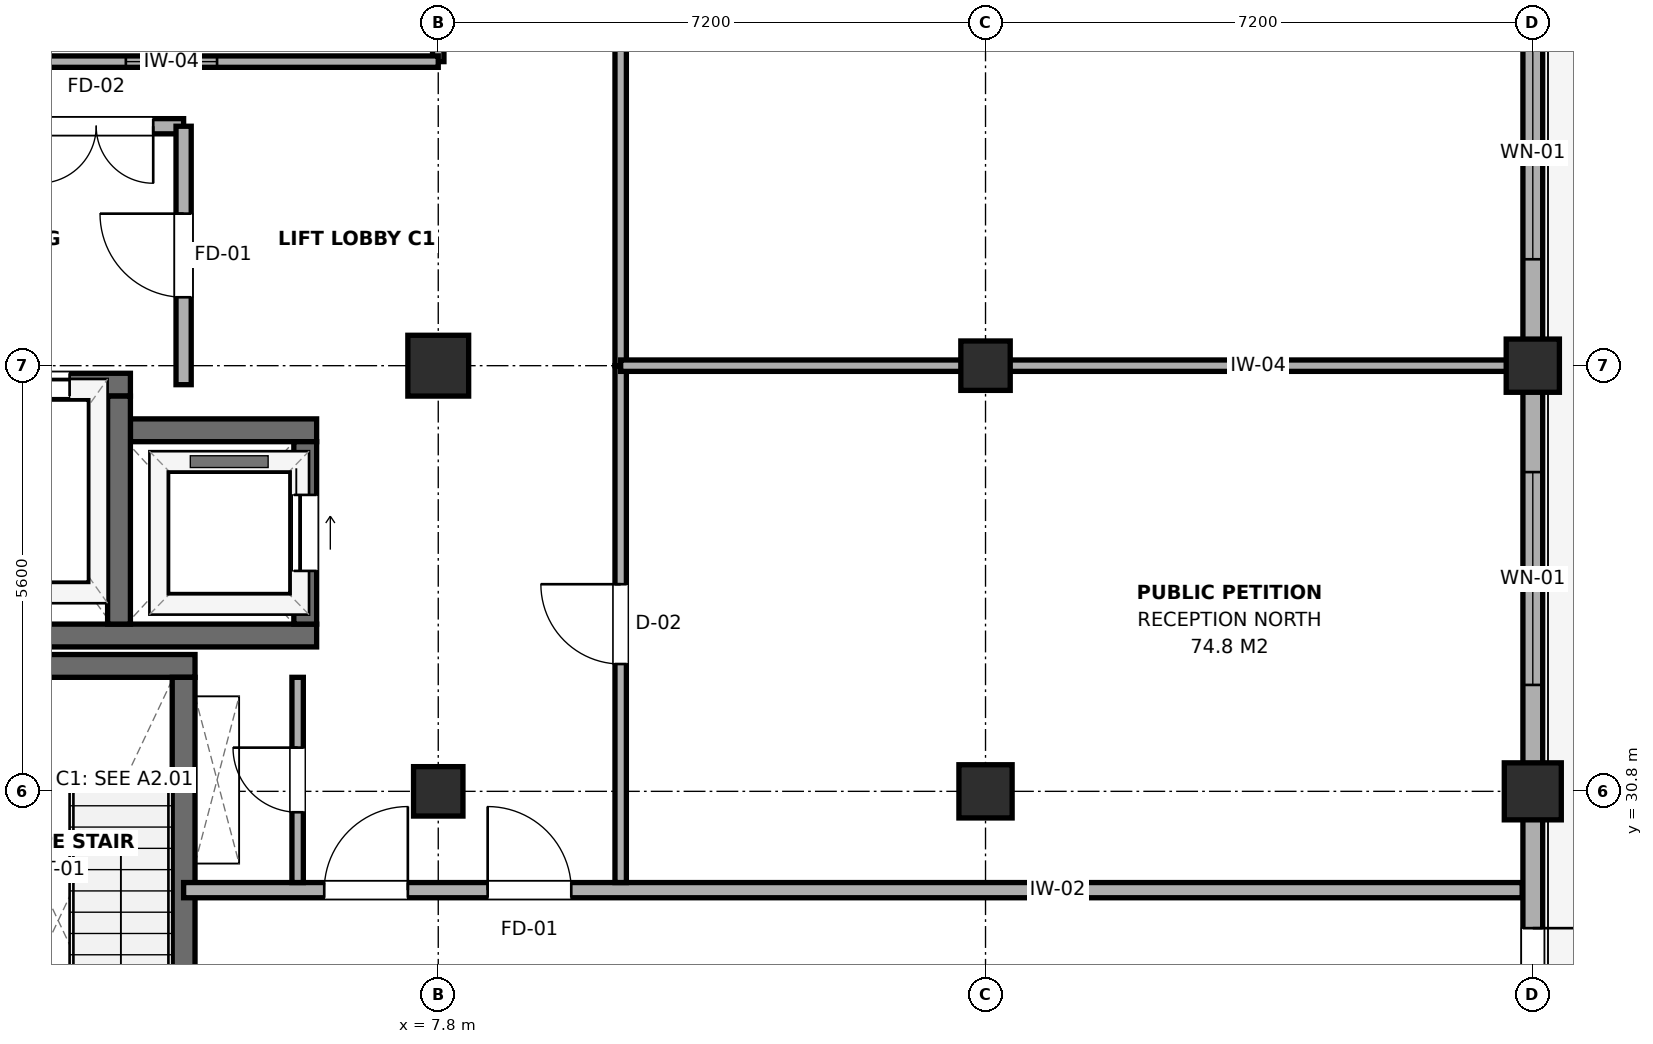
"""IFC4 building model, lengths in metres.
Left out: names, types, materials, properties, quantities, classifications, styles, units other than length and angle.
Written with IfcOpenShell. Run it as: python <this file> out.ifc"""

import sys

from ifc_helpers import new_model, si_unit, direction, frame, frame_2d, origin, origin_2d, place, context, subcontext, project, spatial, rectangle, extrude, element, fill, save


model = new_model("IFC4")
c1 = context("Model", 3, precision=1e-05, world=origin(), true_north=direction((0.0, 1.0)))
c2 = subcontext(c1, "Body", "Model", "MODEL_VIEW")
j1 = project(units=[si_unit("LENGTHUNIT", "METRE"), si_unit("PLANEANGLEUNIT", "RADIAN")], contexts=[c1])
p1 = place(None, origin())
s1 = spatial("IfcSite", under=j1, at=p1, CompositionType="ELEMENT")
p2 = place(p1, origin())
s2 = spatial("IfcBuilding", under=s1, at=p2, CompositionType="ELEMENT")
p3 = place(p2, origin())
s3 = spatial("IfcBuildingStorey", under=s2, at=p3, CompositionType="ELEMENT", Elevation=0.0)
p4 = place(p3, frame((7.8, 30.8, 0.0), z_axis=(0.0, 0.0, 1.0), x_axis=(1.0, 0.0, 0.0)))
e1 = element("IfcColumn", 1, at=p4, inside=s3, PredefinedType="COLUMN", context=c2, shape_type="SweptSolid", body=[
    extrude(rectangle(XDim=0.65, YDim=0.65, at=origin_2d()), origin(), (0.0, 0.0, 1.0), 4.8),
])
p5 = place(p3, frame((7.8, 36.4, 0.0), z_axis=(0.0, 0.0, 1.0), x_axis=(1.0, 0.0, 0.0)))
e2 = element("IfcColumn", 2, at=p5, inside=s3, PredefinedType="COLUMN", context=c2, shape_type="SweptSolid", body=[
    extrude(rectangle(XDim=0.8, YDim=0.8, at=origin_2d()), origin(), (0.0, 0.0, 1.0), 4.8),
])
p6 = place(p3, frame((15.0, 30.8, 0.0), z_axis=(0.0, 0.0, 1.0), x_axis=(1.0, 0.0, 0.0)))
e3 = element("IfcColumn", 3, at=p6, inside=s3, PredefinedType="COLUMN", context=c2, shape_type="SweptSolid", body=[
    extrude(rectangle(XDim=0.7, YDim=0.7, at=origin_2d()), origin(), (0.0, 0.0, 1.0), 4.8),
])
p7 = place(p3, frame((15.0, 36.4, 0.0), z_axis=(0.0, 0.0, 1.0), x_axis=(1.0, 0.0, 0.0)))
e4 = element("IfcColumn", 4, at=p7, inside=s3, PredefinedType="COLUMN", context=c2, shape_type="SweptSolid", body=[
    extrude(rectangle(XDim=0.65, YDim=0.65, at=origin_2d()), origin(), (0.0, 0.0, 1.0), 4.8),
])
p8 = place(p3, frame((22.2, 30.8, 0.0), z_axis=(0.0, 0.0, 1.0), x_axis=(1.0, 0.0, 0.0)))
e5 = element("IfcColumn", 5, at=p8, inside=s3, PredefinedType="COLUMN", context=c2, shape_type="SweptSolid", body=[
    extrude(rectangle(XDim=0.75, YDim=0.75, at=origin_2d()), origin(), (0.0, 0.0, 1.0), 4.8),
])
p9 = place(p3, frame((22.2, 36.4, 0.0), z_axis=(0.0, 0.0, 1.0), x_axis=(1.0, 0.0, 0.0)))
e6 = element("IfcColumn", 6, at=p9, inside=s3, PredefinedType="COLUMN", context=c2, shape_type="SweptSolid", body=[
    extrude(rectangle(XDim=0.7, YDim=0.7, at=origin_2d()), origin(), (0.0, 0.0, 1.0), 4.8),
])
p10 = place(p3, frame((0.75, 32.45, 0.0), z_axis=(0.0, 0.0, 1.0), x_axis=(1.0, 0.0, 0.0)))
e7 = element("IfcWall", 7, at=p10, inside=s3, PredefinedType="SHEAR", context=c2, shape_type="SweptSolid", body=[
    extrude(rectangle(XDim=3.85, YDim=0.3, at=frame_2d((1.925, 0.0))), origin(), (0.0, 0.0, 1.0), 4.56),
])
p11 = place(p3, frame((4.45, 25.9, 0.0), z_axis=(0.0, 0.0, 1.0), x_axis=(0.0, 1.0, 0.0)))
e8 = element("IfcWall", 8, at=p11, inside=s3, PredefinedType="SHEAR", context=c2, shape_type="SweptSolid", body=[
    extrude(rectangle(XDim=6.4, YDim=0.3, at=frame_2d((3.2, 0.0))), origin(), (0.0, 0.0, 1.0), 4.56),
])
p12 = place(p11, frame((0.17, 0.0, 0.0)))
e9 = element("IfcOpeningElement", 9, at=p12, cuts=e8, PredefinedType="OPENING", context=c2, shape_type="SweptSolid", body=[
    extrude(rectangle(XDim=1.1, YDim=2.15, at=frame_2d((0.55, 1.075))), frame((0.0, 0.165, 0.0), z_axis=(0.0, -1.0, 0.0), x_axis=(1.0, 0.0, 0.0)), (0.0, 0.0, 1.0), 0.33),
])
p13 = place(p3, frame((0.75, 32.85, 0.0), z_axis=(0.0, 0.0, 1.0), x_axis=(1.0, 0.0, 0.0)))
e10 = element("IfcWall", 10, at=p13, inside=s3, PredefinedType="SHEAR", context=c2, shape_type="SweptSolid", body=[
    extrude(rectangle(XDim=5.45, YDim=0.3, at=frame_2d((2.725, 0.0))), origin(), (0.0, 0.0, 1.0), 4.56),
])
p14 = place(p3, frame((0.75, 36.15, 0.0), z_axis=(0.0, 0.0, 1.0), x_axis=(1.0, 0.0, 0.0)))
e11 = element("IfcWall", 11, at=p14, inside=s3, PredefinedType="SHEAR", context=c2, shape_type="SweptSolid", body=[
    extrude(rectangle(XDim=3.0, YDim=0.3, at=frame_2d((1.5, 0.0))), origin(), (0.0, 0.0, 1.0), 4.56),
])
p15 = place(p14, frame((1.1, 0.0, 0.0)))
e12 = element("IfcOpeningElement", 12, at=p15, cuts=e11, PredefinedType="OPENING", context=c2, shape_type="SweptSolid", body=[
    extrude(rectangle(XDim=1.1, YDim=2.15, at=frame_2d((0.55, 1.075))), frame((0.0, 0.165, 0.0), z_axis=(0.0, -1.0, 0.0), x_axis=(1.0, 0.0, 0.0)), (0.0, 0.0, 1.0), 0.33),
])
p16 = place(p3, frame((3.75, 35.55, 0.0), z_axis=(0.0, 0.0, 1.0), x_axis=(1.0, 0.0, 0.0)))
e13 = element("IfcWall", 13, at=p16, inside=s3, PredefinedType="SHEAR", context=c2, shape_type="SweptSolid", body=[
    extrude(rectangle(XDim=2.45, YDim=0.3, at=frame_2d((1.225, 0.0))), origin(), (0.0, 0.0, 1.0), 4.56),
])
p17 = place(p3, frame((3.6, 33.0, 0.0), z_axis=(0.0, 0.0, 1.0), x_axis=(0.0, 1.0, 0.0)))
e14 = element("IfcWall", 14, at=p17, inside=s3, PredefinedType="SHEAR", context=c2, shape_type="SweptSolid", body=[
    extrude(rectangle(XDim=3.0, YDim=0.3, at=frame_2d((1.5, 0.0))), origin(), (0.0, 0.0, 1.0), 4.56),
])
p18 = place(p3, frame((6.05, 33.0, 0.0), z_axis=(0.0, 0.0, 1.0), x_axis=(0.0, 1.0, 0.0)))
e15 = element("IfcWall", 15, at=p18, inside=s3, PredefinedType="SHEAR", context=c2, shape_type="SweptSolid", body=[
    extrude(rectangle(XDim=2.4, YDim=0.3, at=frame_2d((1.2, 0.0))), origin(), (0.0, 0.0, 1.0), 4.56),
])
p19 = place(p18, frame((0.7, 0.0, 0.0)))
e16 = element("IfcOpeningElement", 16, at=p19, cuts=e15, PredefinedType="OPENING", context=c2, shape_type="SweptSolid", body=[
    extrude(rectangle(XDim=1.0, YDim=2.15, at=frame_2d((0.5, 1.075))), frame((0.0, 0.165, 0.0), z_axis=(0.0, -1.0, 0.0), x_axis=(1.0, 0.0, 0.0)), (0.0, 0.0, 1.0), 0.33),
])
p20 = place(p3, frame((22.2, 25.2, 0.0), z_axis=(0.0, 0.0, 1.0), x_axis=(0.0, 1.0, 0.0)))
e17 = element("IfcWall", 17, at=p20, inside=s3, PredefinedType="SOLIDWALL", context=c2, shape_type="SweptSolid", body=[
    extrude(rectangle(XDim=5.6, YDim=0.26, at=frame_2d((2.8, 0.0))), origin(), (0.0, 0.0, 1.0), 4.005),
])
p21 = place(p20, frame((1.8, 0.0, 0.0)))
e18 = element("IfcOpeningElement", 18, at=p21, cuts=e17, PredefinedType="OPENING", context=c2, shape_type="SweptSolid", body=[
    extrude(rectangle(XDim=2.0, YDim=2.25, at=frame_2d((1.0, 1.125))), frame((0.0, 0.145, 0.0), z_axis=(0.0, -1.0, 0.0), x_axis=(1.0, 0.0, 0.0)), (0.0, 0.0, 1.0), 0.29),
])
p22 = place(p3, frame((22.2, 30.8, 0.0), z_axis=(0.0, 0.0, 1.0), x_axis=(0.0, 1.0, 0.0)))
e19 = element("IfcWall", 19, at=p22, inside=s3, PredefinedType="SOLIDWALL", context=c2, shape_type="SweptSolid", body=[
    extrude(rectangle(XDim=5.6, YDim=0.26, at=frame_2d((2.8, 0.0))), origin(), (0.0, 0.0, 1.0), 4.055),
])
p23 = place(p22, frame((1.4, 0.0, 0.9)))
e20 = element("IfcOpeningElement", 20, at=p23, cuts=e19, PredefinedType="OPENING", context=c2, shape_type="SweptSolid", body=[
    extrude(rectangle(XDim=2.8, YDim=2.2, at=frame_2d((1.4, 1.1))), frame((0.0, 0.145, 0.0), z_axis=(0.0, -1.0, 0.0), x_axis=(1.0, 0.0, 0.0)), (0.0, 0.0, 1.0), 0.29),
])
p24 = place(p3, frame((22.2, 36.4, 0.0), z_axis=(0.0, 0.0, 1.0), x_axis=(0.0, 1.0, 0.0)))
e21 = element("IfcWall", 21, at=p24, inside=s3, PredefinedType="SOLIDWALL", context=c2, shape_type="SweptSolid", body=[
    extrude(rectangle(XDim=5.6, YDim=0.26, at=frame_2d((2.8, 0.0))), origin(), (0.0, 0.0, 1.0), 4.105),
])
p25 = place(p24, frame((1.4, 0.0, 0.9)))
e22 = element("IfcOpeningElement", 22, at=p25, cuts=e21, PredefinedType="OPENING", context=c2, shape_type="SweptSolid", body=[
    extrude(rectangle(XDim=2.8, YDim=2.2, at=frame_2d((1.4, 1.1))), frame((0.0, 0.145, 0.0), z_axis=(0.0, -1.0, 0.0), x_axis=(1.0, 0.0, 0.0)), (0.0, 0.0, 1.0), 0.29),
])
p26 = place(p3, frame((0.95, 39.55, 0.0), z_axis=(0.0, 0.0, 1.0), x_axis=(1.0, 0.0, 0.0)))
e23 = element("IfcWall", 23, at=p26, inside=s3, PredefinedType="PARTITIONING", context=c2, shape_type="SweptSolid", body=[
    extrude(rectangle(XDim=3.5, YDim=0.2, at=frame_2d((1.75, 0.0))), origin(), (0.0, 0.0, 1.0), 4.555),
])
p27 = place(p26, frame((1.6, 0.0, 0.0)))
e24 = element("IfcOpeningElement", 24, at=p27, cuts=e23, PredefinedType="OPENING", context=c2, shape_type="SweptSolid", body=[
    extrude(rectangle(XDim=1.5, YDim=2.15, at=frame_2d((0.75, 1.075))), frame((0.0, 0.115, 0.0), z_axis=(0.0, -1.0, 0.0), x_axis=(1.0, 0.0, 0.0)), (0.0, 0.0, 1.0), 0.23),
])
p28 = place(p3, frame((4.45, 36.15, 0.0), z_axis=(0.0, 0.0, 1.0), x_axis=(0.0, 1.0, 0.0)))
e25 = element("IfcWall", 25, at=p28, inside=s3, PredefinedType="PARTITIONING", context=c2, shape_type="SweptSolid", body=[
    extrude(rectangle(XDim=3.4, YDim=0.2, at=frame_2d((1.7, 0.0))), origin(), (0.0, 0.0, 1.0), 4.205),
])
p29 = place(p28, frame((1.15, 0.0, 0.0)))
e26 = element("IfcOpeningElement", 26, at=p29, cuts=e25, PredefinedType="OPENING", context=c2, shape_type="SweptSolid", body=[
    extrude(rectangle(XDim=1.1, YDim=2.15, at=frame_2d((0.55, 1.075))), frame((0.0, 0.115, 0.0), z_axis=(0.0, -1.0, 0.0), x_axis=(1.0, 0.0, 0.0)), (0.0, 0.0, 1.0), 0.23),
])
p30 = place(p3, frame((4.45, 29.5, 0.0), z_axis=(0.0, 0.0, 1.0), x_axis=(1.0, 0.0, 0.0)))
e27 = element("IfcWall", 27, at=p30, inside=s3, PredefinedType="PARTITIONING", context=c2, shape_type="SweptSolid", body=[
    extrude(rectangle(XDim=17.61, YDim=0.2, at=frame_2d((8.805, 0.0))), origin(), (0.0, 0.0, 1.0), 4.005),
])
p31 = place(p30, frame((1.85, 0.0, 0.0)))
e28 = element("IfcOpeningElement", 28, at=p31, cuts=e27, PredefinedType="OPENING", context=c2, shape_type="SweptSolid", body=[
    extrude(rectangle(XDim=1.1, YDim=2.15, at=frame_2d((0.55, 1.075))), frame((0.0, 0.115, 0.0), z_axis=(0.0, -1.0, 0.0), x_axis=(1.0, 0.0, 0.0)), (0.0, 0.0, 1.0), 0.23),
])
p32 = place(p30, frame((4.0, 0.0, 0.0)))
e29 = element("IfcOpeningElement", 29, at=p32, cuts=e27, PredefinedType="OPENING", context=c2, shape_type="SweptSolid", body=[
    extrude(rectangle(XDim=1.1, YDim=2.15, at=frame_2d((0.55, 1.075))), frame((0.0, 0.115, 0.0), z_axis=(0.0, -1.0, 0.0), x_axis=(1.0, 0.0, 0.0)), (0.0, 0.0, 1.0), 0.23),
])
p33 = place(p3, frame((5.95, 29.6, 0.0), z_axis=(0.0, 0.0, 1.0), x_axis=(0.0, 1.0, 0.0)))
e30 = element("IfcWall", 30, at=p33, inside=s3, PredefinedType="PARTITIONING", context=c2, shape_type="SweptSolid", body=[
    extrude(rectangle(XDim=2.7, YDim=0.15, at=frame_2d((1.35, 0.0))), origin(), (0.0, 0.0, 1.0), 4.555),
])
p34 = place(p33, frame((0.925, 0.0, 0.0)))
e31 = element("IfcOpeningElement", 31, at=p34, cuts=e30, PredefinedType="OPENING", context=c2, shape_type="SweptSolid", body=[
    extrude(rectangle(XDim=0.85, YDim=2.1, at=frame_2d((0.425, 1.05))), frame((0.0, 0.09, 0.0), z_axis=(0.0, -1.0, 0.0), x_axis=(1.0, 0.0, 0.0)), (0.0, 0.0, 1.0), 0.18),
])
p35 = place(p3, frame((7.8, 40.4, 0.0), z_axis=(0.0, 0.0, 1.0), x_axis=(0.0, 1.0, 0.0)))
e32 = element("IfcWall", 32, at=p35, inside=s3, PredefinedType="PARTITIONING", context=c2, shape_type="SweptSolid", body=[
    extrude(rectangle(XDim=18.4, YDim=0.15, at=frame_2d((9.2, 0.0))), origin(), (0.0, 0.0, 1.0), 3.955),
])
p36 = place(p35, frame((8.4, 0.0, 0.0)))
e33 = element("IfcOpeningElement", 33, at=p36, cuts=e32, PredefinedType="OPENING", context=c2, shape_type="SweptSolid", body=[
    extrude(rectangle(XDim=1.6, YDim=2.15, at=frame_2d((0.8, 1.075))), frame((0.0, 0.09, 0.0), z_axis=(0.0, -1.0, 0.0), x_axis=(1.0, 0.0, 0.0)), (0.0, 0.0, 1.0), 0.18),
])
p37 = place(p35, frame((3.3, 0.0, 0.95)))
e34 = element("IfcOpeningElement", 34, at=p37, cuts=e32, PredefinedType="OPENING", context=c2, shape_type="SweptSolid", body=[
    extrude(rectangle(XDim=2.6, YDim=1.5, at=frame_2d((1.3, 0.75))), frame((0.0, 0.09, 0.0), z_axis=(0.0, -1.0, 0.0), x_axis=(1.0, 0.0, 0.0)), (0.0, 0.0, 1.0), 0.18),
])
p38 = place(p3, frame((0.78, 40.4, 0.0), z_axis=(0.0, 0.0, 1.0), x_axis=(1.0, 0.0, 0.0)))
e35 = element("IfcWall", 35, at=p38, inside=s3, PredefinedType="PARTITIONING", context=c2, shape_type="SweptSolid", body=[
    extrude(rectangle(XDim=7.02, YDim=0.15, at=frame_2d((3.51, 0.0))), origin(), (0.0, 0.0, 1.0), 4.105),
])
p39 = place(p38, frame((2.91, 0.0, 0.95)))
e36 = element("IfcOpeningElement", 36, at=p39, cuts=e35, PredefinedType="OPENING", context=c2, shape_type="SweptSolid", body=[
    extrude(rectangle(XDim=1.2, YDim=1.5, at=frame_2d((0.6, 0.75))), frame((0.0, 0.09, 0.0), z_axis=(0.0, -1.0, 0.0), x_axis=(1.0, 0.0, 0.0)), (0.0, 0.0, 1.0), 0.18),
])
p40 = place(p3, frame((10.2, 29.6, 0.0), z_axis=(0.0, 0.0, 1.0), x_axis=(0.0, 1.0, 0.0)))
e37 = element("IfcWall", 37, at=p40, inside=s3, PredefinedType="PARTITIONING", context=c2, shape_type="SweptSolid", body=[
    extrude(rectangle(XDim=6.8, YDim=0.15, at=frame_2d((3.4, 0.0))), origin(), (0.0, 0.0, 1.0), 4.055),
])
p41 = place(p40, frame((2.875, 0.0, 0.0)))
e38 = element("IfcOpeningElement", 38, at=p41, cuts=e37, PredefinedType="OPENING", context=c2, shape_type="SweptSolid", body=[
    extrude(rectangle(XDim=1.05, YDim=2.15, at=frame_2d((0.525, 1.075))), frame((0.0, 0.09, 0.0), z_axis=(0.0, -1.0, 0.0), x_axis=(1.0, 0.0, 0.0)), (0.0, 0.0, 1.0), 0.18),
])
p42 = place(p3, frame((10.2, 36.4, 0.0), z_axis=(0.0, 0.0, 1.0), x_axis=(0.0, 1.0, 0.0)))
e39 = element("IfcWall", 39, at=p42, inside=s3, PredefinedType="PARTITIONING", context=c2, shape_type="SweptSolid", body=[
    extrude(rectangle(XDim=22.4, YDim=0.15, at=frame_2d((11.2, 0.0))), origin(), (0.0, 0.0, 1.0), 4.055),
])
p43 = place(p42, frame((10.4, 0.0, 0.0)))
e40 = element("IfcOpeningElement", 40, at=p43, cuts=e39, PredefinedType="OPENING", context=c2, shape_type="SweptSolid", body=[
    extrude(rectangle(XDim=1.6, YDim=2.15, at=frame_2d((0.8, 1.075))), frame((0.0, 0.09, 0.0), z_axis=(0.0, -1.0, 0.0), x_axis=(1.0, 0.0, 0.0)), (0.0, 0.0, 1.0), 0.18),
])
p44 = place(p42, frame((4.3, 0.0, 0.95)))
e41 = element("IfcOpeningElement", 41, at=p44, cuts=e39, PredefinedType="OPENING", context=c2, shape_type="SweptSolid", body=[
    extrude(rectangle(XDim=2.6, YDim=1.5, at=frame_2d((1.3, 0.75))), frame((0.0, 0.09, 0.0), z_axis=(0.0, -1.0, 0.0), x_axis=(1.0, 0.0, 0.0)), (0.0, 0.0, 1.0), 0.18),
])
p45 = place(p42, frame((15.5, 0.0, 0.95)))
e42 = element("IfcOpeningElement", 42, at=p45, cuts=e39, PredefinedType="OPENING", context=c2, shape_type="SweptSolid", body=[
    extrude(rectangle(XDim=2.6, YDim=1.5, at=frame_2d((1.3, 0.75))), frame((0.0, 0.09, 0.0), z_axis=(0.0, -1.0, 0.0), x_axis=(1.0, 0.0, 0.0)), (0.0, 0.0, 1.0), 0.18),
])
p46 = place(p3, frame((10.2, 36.4, 0.0), z_axis=(0.0, 0.0, 1.0), x_axis=(1.0, 0.0, 0.0)))
e43 = element("IfcWall", 43, at=p46, inside=s3, PredefinedType="PARTITIONING", context=c2, shape_type="SweptSolid", body=[
    extrude(rectangle(XDim=11.86, YDim=0.15, at=frame_2d((5.93, 0.0))), origin(), (0.0, 0.0, 1.0), 3.955),
])
p47 = place(p21, frame((2.0, 0.0, 0.0), z_axis=(0.0, 0.0, 1.0), x_axis=(-1.0, 0.0, 0.0)))
e44 = element("IfcDoor", 44, at=p47, inside=s3, OperationType="DOUBLE_DOOR_SINGLE_SWING", PredefinedType="DOOR", context=c2, shape_type="SweptSolid", body=[
    extrude(rectangle(XDim=2.0, YDim=2.25, at=frame_2d((1.0, 1.125))), frame((0.0, 0.025, 0.0), z_axis=(0.0, -1.0, 0.0), x_axis=(1.0, 0.0, 0.0)), (0.0, 0.0, 1.0), 0.05),
])
fill(e18, e44)
p48 = place(p23, origin())
e45 = element("IfcWindow", 45, at=p48, inside=s3, PartitioningType="SINGLE_PANEL", PredefinedType="WINDOW", context=c2, shape_type="SweptSolid", body=[
    extrude(rectangle(XDim=2.8, YDim=2.2, at=frame_2d((1.4, 1.1))), frame((0.0, 0.03, 0.0), z_axis=(0.0, -1.0, 0.0), x_axis=(1.0, 0.0, 0.0)), (0.0, 0.0, 1.0), 0.06),
])
fill(e20, e45)
p49 = place(p25, origin())
e46 = element("IfcWindow", 46, at=p49, inside=s3, PartitioningType="SINGLE_PANEL", PredefinedType="WINDOW", context=c2, shape_type="SweptSolid", body=[
    extrude(rectangle(XDim=2.8, YDim=2.2, at=frame_2d((1.4, 1.1))), frame((0.0, 0.03, 0.0), z_axis=(0.0, -1.0, 0.0), x_axis=(1.0, 0.0, 0.0)), (0.0, 0.0, 1.0), 0.06),
])
fill(e22, e46)
p50 = place(p15, origin())
e47 = element("IfcDoor", 47, at=p50, inside=s3, OperationType="SLIDING_TO_LEFT", PredefinedType="DOOR", context=c2, shape_type="SweptSolid", body=[
    extrude(rectangle(XDim=1.1, YDim=2.15, at=frame_2d((0.55, 1.075))), frame((0.0, 0.025, 0.0), z_axis=(0.0, -1.0, 0.0), x_axis=(1.0, 0.0, 0.0)), (0.0, 0.0, 1.0), 0.05),
])
fill(e12, e47)
p51 = place(p19, frame((1.0, 0.0, 0.0), z_axis=(0.0, 0.0, 1.0), x_axis=(-1.0, 0.0, 0.0)))
e48 = element("IfcDoor", 48, at=p51, inside=s3, OperationType="SLIDING_TO_RIGHT", PredefinedType="DOOR", context=c2, shape_type="SweptSolid", body=[
    extrude(rectangle(XDim=1.0, YDim=2.15, at=frame_2d((0.5, 1.075))), frame((0.0, 0.025, 0.0), z_axis=(0.0, -1.0, 0.0), x_axis=(1.0, 0.0, 0.0)), (0.0, 0.0, 1.0), 0.05),
])
fill(e16, e48)
p52 = place(p27, frame((1.5, 0.0, 0.0), z_axis=(0.0, 0.0, 1.0), x_axis=(-1.0, 0.0, 0.0)))
e49 = element("IfcDoor", 49, at=p52, inside=s3, OperationType="DOUBLE_DOOR_SINGLE_SWING", PredefinedType="DOOR", context=c2, shape_type="SweptSolid", body=[
    extrude(rectangle(XDim=1.5, YDim=2.15, at=frame_2d((0.75, 1.075))), frame((0.0, 0.025, 0.0), z_axis=(0.0, -1.0, 0.0), x_axis=(1.0, 0.0, 0.0)), (0.0, 0.0, 1.0), 0.05),
])
fill(e24, e49)
p53 = place(p29, origin())
e50 = element("IfcDoor", 50, at=p53, inside=s3, OperationType="SINGLE_SWING_RIGHT", PredefinedType="DOOR", context=c2, shape_type="SweptSolid", body=[
    extrude(rectangle(XDim=1.1, YDim=2.15, at=frame_2d((0.55, 1.075))), frame((0.0, 0.025, 0.0), z_axis=(0.0, -1.0, 0.0), x_axis=(1.0, 0.0, 0.0)), (0.0, 0.0, 1.0), 0.05),
])
fill(e26, e50)
p54 = place(p31, origin())
e51 = element("IfcDoor", 51, at=p54, inside=s3, OperationType="SINGLE_SWING_RIGHT", PredefinedType="DOOR", context=c2, shape_type="SweptSolid", body=[
    extrude(rectangle(XDim=1.1, YDim=2.15, at=frame_2d((0.55, 1.075))), frame((0.0, 0.025, 0.0), z_axis=(0.0, -1.0, 0.0), x_axis=(1.0, 0.0, 0.0)), (0.0, 0.0, 1.0), 0.05),
])
fill(e28, e51)
p55 = place(p32, origin())
e52 = element("IfcDoor", 52, at=p55, inside=s3, OperationType="SINGLE_SWING_LEFT", PredefinedType="DOOR", context=c2, shape_type="SweptSolid", body=[
    extrude(rectangle(XDim=1.1, YDim=2.15, at=frame_2d((0.55, 1.075))), frame((0.0, 0.025, 0.0), z_axis=(0.0, -1.0, 0.0), x_axis=(1.0, 0.0, 0.0)), (0.0, 0.0, 1.0), 0.05),
])
fill(e29, e52)
p56 = place(p34, origin())
e53 = element("IfcDoor", 53, at=p56, inside=s3, OperationType="SINGLE_SWING_RIGHT", PredefinedType="DOOR", context=c2, shape_type="SweptSolid", body=[
    extrude(rectangle(XDim=0.85, YDim=2.1, at=frame_2d((0.425, 1.05))), frame((0.0, 0.025, 0.0), z_axis=(0.0, -1.0, 0.0), x_axis=(1.0, 0.0, 0.0)), (0.0, 0.0, 1.0), 0.05),
])
fill(e31, e53)
p57 = place(p39, origin())
e54 = element("IfcWindow", 54, at=p57, inside=s3, PartitioningType="SINGLE_PANEL", PredefinedType="WINDOW", context=c2, shape_type="SweptSolid", body=[
    extrude(rectangle(XDim=1.2, YDim=1.5, at=frame_2d((0.6, 0.75))), frame((0.0, 0.03, 0.0), z_axis=(0.0, -1.0, 0.0), x_axis=(1.0, 0.0, 0.0)), (0.0, 0.0, 1.0), 0.06),
])
fill(e36, e54)
p58 = place(p41, origin())
e55 = element("IfcDoor", 55, at=p58, inside=s3, OperationType="SINGLE_SWING_RIGHT", PredefinedType="DOOR", context=c2, shape_type="SweptSolid", body=[
    extrude(rectangle(XDim=1.05, YDim=2.15, at=frame_2d((0.525, 1.075))), frame((0.0, 0.025, 0.0), z_axis=(0.0, -1.0, 0.0), x_axis=(1.0, 0.0, 0.0)), (0.0, 0.0, 1.0), 0.05),
])
fill(e38, e55)
save(model, sys.argv[1])
